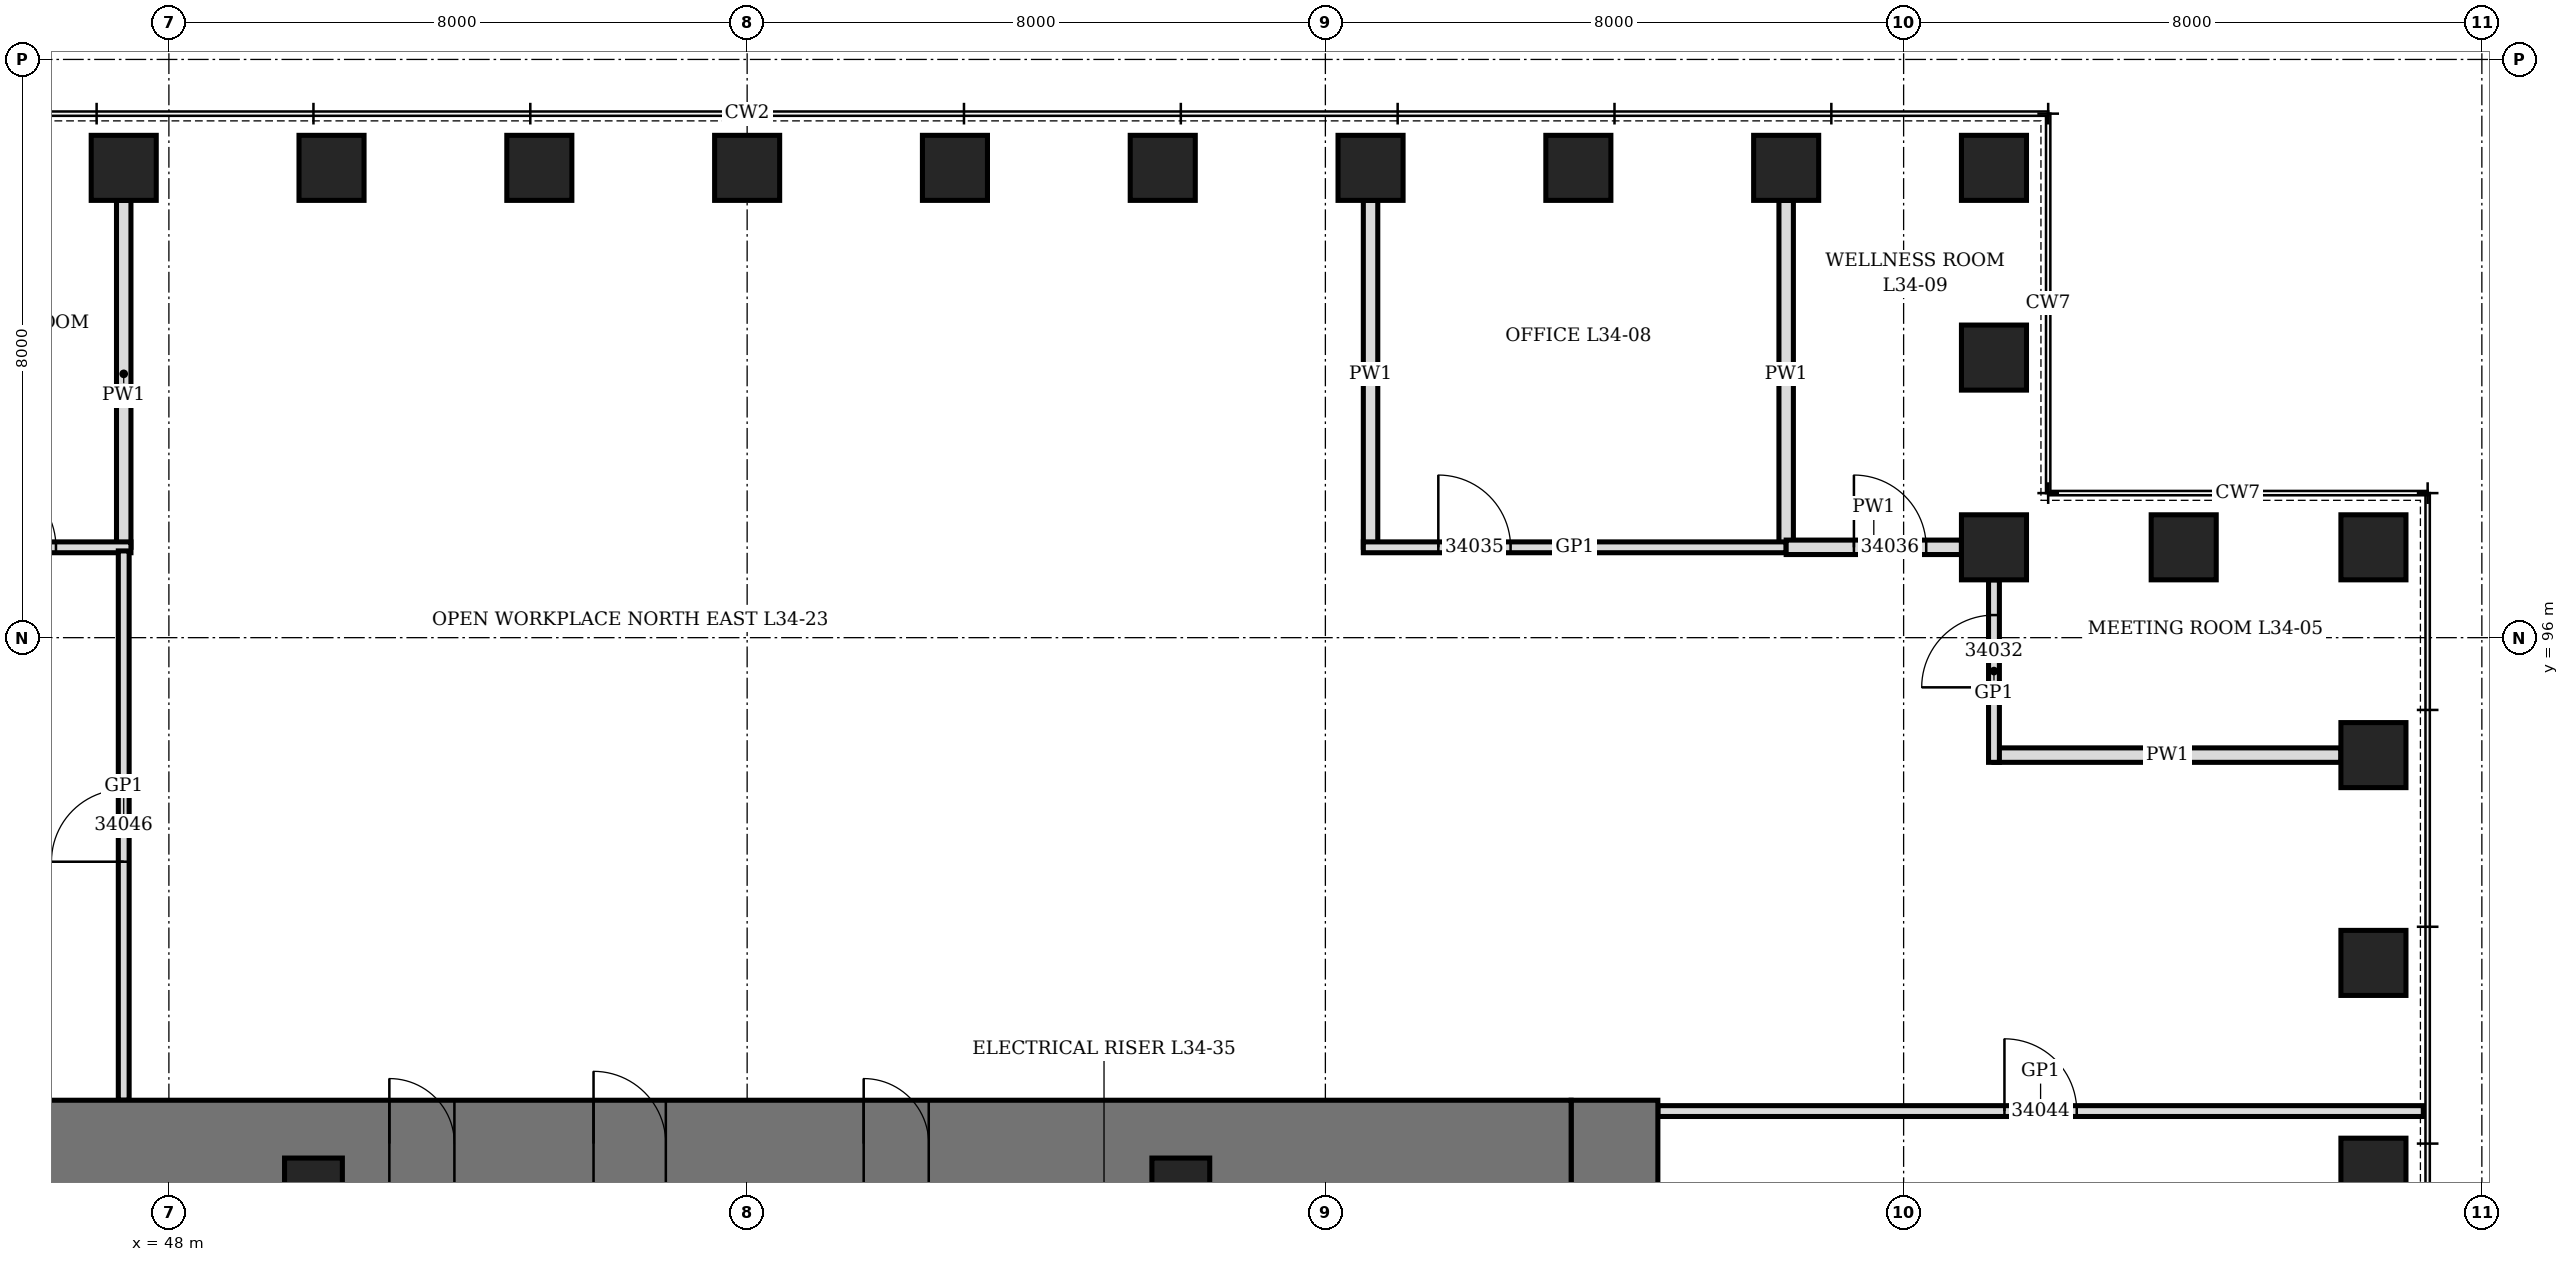
"""IFC4 building model, lengths in metres.
Left out: names, types, materials, properties, quantities, classifications, styles, units other than length and angle.
Written with IfcOpenShell. Run it as: python <this file> out.ifc"""

import sys

from ifc_helpers import new_model, si_unit, direction, frame, frame_2d, origin, origin_2d, place, context, subcontext, project, spatial, rectangle, hollow_rectangle, extrude, element, fill, save


model = new_model("IFC4")
c1 = context("Model", 3, precision=1e-05, world=origin(), true_north=direction((0.0, 1.0)))
c2 = subcontext(c1, "Body", "Model", "MODEL_VIEW")
j1 = project(units=[si_unit("LENGTHUNIT", "METRE"), si_unit("PLANEANGLEUNIT", "RADIAN")], contexts=[c1])
p1 = place(None, origin())
s1 = spatial("IfcSite", under=j1, at=p1, CompositionType="ELEMENT")
p2 = place(p1, origin())
s2 = spatial("IfcBuilding", under=s1, at=p2, CompositionType="ELEMENT")
p3 = place(p2, frame((0.0, 0.0, 154.3)))
s3 = spatial("IfcBuildingStorey", under=s2, at=p3, CompositionType="ELEMENT", Elevation=154.3)
for number, where, z_axis, x_axis in (
    (1, (78.5, 88.625, 0.0), (0.0, 0.0, 1.0), (0.0, 1.0, 0.0)),
    (2, (78.5, 91.5, 0.0), (0.0, 0.0, 1.0), (0.0, 1.0, 0.0)),
    (3, (78.5, 94.375, 0.0), (0.0, 0.0, 1.0), (0.0, 1.0, 0.0)),
    (4, (78.5, 97.25, 0.0), (0.0, 0.0, 1.0), (1.0, 0.0, 0.0)),
    (5, (75.875, 97.25, 0.0), (0.0, 0.0, 1.0), (1.0, 0.0, 0.0)),
    (6, (73.25, 97.25, 0.0), (0.0, 0.0, 1.0), (0.0, 1.0, 0.0)),
    (7, (73.25, 99.875, 0.0), (0.0, 0.0, 1.0), (0.0, 1.0, 0.0)),
    (8, (73.25, 102.5, 0.0), (0.0, 0.0, 1.0), (1.0, 0.0, 0.0)),
    (9, (70.375, 102.5, 0.0), (0.0, 0.0, 1.0), (1.0, 0.0, 0.0)),
    (10, (67.5, 102.5, 0.0), (0.0, 0.0, 1.0), (1.0, 0.0, 0.0)),
    (11, (64.625, 102.5, 0.0), (0.0, 0.0, 1.0), (1.0, 0.0, 0.0)),
    (12, (61.75, 102.5, 0.0), (0.0, 0.0, 1.0), (1.0, 0.0, 0.0)),
    (13, (58.875, 102.5, 0.0), (0.0, 0.0, 1.0), (1.0, 0.0, 0.0)),
    (14, (56.0, 102.5, 0.0), (0.0, 0.0, 1.0), (1.0, 0.0, 0.0)),
    (15, (53.125, 102.5, 0.0), (0.0, 0.0, 1.0), (1.0, 0.0, 0.0)),
    (16, (50.25, 102.5, 0.0), (0.0, 0.0, 1.0), (1.0, 0.0, 0.0)),
    (17, (47.375, 102.5, 0.0), (0.0, 0.0, 1.0), (1.0, 0.0, 0.0)),
):
    element("IfcColumn", number, at=place(p3, frame(where, z_axis=z_axis, x_axis=x_axis)), inside=s3, PredefinedType="COLUMN", context=c2, shape_type="SweptSolid", body=[
        extrude(hollow_rectangle(XDim=0.9, YDim=0.9, WallThickness=0.12, at=origin_2d()), origin(), (0.0, 0.0, 1.0), 4.2),
    ])
p4 = place(p3, frame((68.0, 70.4, 0.0), z_axis=(0.0, 0.0, 1.0), x_axis=(0.0, 1.0, 0.0)))
e18 = element("IfcWall", 18, at=p4, inside=s3, PredefinedType="SHEAR", context=c2, shape_type="SweptSolid", body=[
    extrude(rectangle(XDim=19.2, YDim=1.2, at=frame_2d((9.6, 0.0))), origin(), (0.0, 0.0, 1.0), 4.2),
])
p5 = place(p4, frame((8.6, 0.0, 0.0)))
e19 = element("IfcOpeningElement", 19, at=p5, cuts=e18, PredefinedType="OPENING", context=c2, shape_type="SweptSolid", body=[
    extrude(rectangle(XDim=2.0, YDim=2.4, at=frame_2d((1.0, 1.2))), frame((0.0, 0.61, 0.0), z_axis=(0.0, -1.0, 0.0), x_axis=(1.0, 0.0, 0.0)), (0.0, 0.0, 1.0), 1.22),
])
p6 = place(p3, frame((44.6, 89.0, 0.0), z_axis=(0.0, 0.0, 1.0), x_axis=(1.0, 0.0, 0.0)))
e20 = element("IfcWall", 20, at=p6, inside=s3, PredefinedType="SHEAR", context=c2, shape_type="SweptSolid", body=[
    extrude(rectangle(XDim=22.8, YDim=1.2, at=frame_2d((11.4, 0.0))), origin(), (0.0, 0.0, 1.0), 4.2),
])
p7 = place(p6, frame((9.275, 0.0, 0.0)))
e21 = element("IfcOpeningElement", 21, at=p7, cuts=e20, PredefinedType="OPENING", context=c2, shape_type="SweptSolid", body=[
    extrude(rectangle(XDim=1.0, YDim=2.1, at=frame_2d((0.5, 1.05))), frame((0.0, 0.61, 0.0), z_axis=(0.0, -1.0, 0.0), x_axis=(1.0, 0.0, 0.0)), (0.0, 0.0, 1.0), 1.22),
])
p8 = place(p6, frame((6.45, 0.0, 0.0)))
e22 = element("IfcOpeningElement", 22, at=p8, cuts=e20, PredefinedType="OPENING", context=c2, shape_type="SweptSolid", body=[
    extrude(rectangle(XDim=0.9, YDim=2.1, at=frame_2d((0.45, 1.05))), frame((0.0, 0.61, 0.0), z_axis=(0.0, -1.0, 0.0), x_axis=(1.0, 0.0, 0.0)), (0.0, 0.0, 1.0), 1.22),
])
p9 = place(p6, frame((13.012, 0.0, 0.0)))
e23 = element("IfcOpeningElement", 23, at=p9, cuts=e20, PredefinedType="OPENING", context=c2, shape_type="SweptSolid", body=[
    extrude(rectangle(XDim=0.9, YDim=2.1, at=frame_2d((0.45, 1.05))), frame((0.0, 0.61, 0.0), z_axis=(0.0, -1.0, 0.0), x_axis=(1.0, 0.0, 0.0)), (0.0, 0.0, 1.0), 1.22),
])
for number, where, z_axis, x_axis in (
    (24, (50.0, 88.4, 0.0), (0.0, 0.0, 1.0), (1.0, 0.0, 0.0)),
    (25, (62.0, 88.4, 0.0), (0.0, 0.0, 1.0), (1.0, 0.0, 0.0)),
):
    element("IfcColumn", number, at=place(p3, frame(where, z_axis=z_axis, x_axis=x_axis)), inside=s3, PredefinedType="COLUMN", context=c2, shape_type="SweptSolid", body=[
        extrude(hollow_rectangle(XDim=0.8, YDim=0.8, WallThickness=0.1, at=origin_2d()), origin(), (0.0, 0.0, 1.0), 4.2),
    ])
p10 = place(p3, frame((73.25, 94.375, 0.0), z_axis=(0.0, 0.0, 1.0), x_axis=(1.0, 0.0, 0.0)))
e26 = element("IfcWall", 26, at=p10, inside=s3, PredefinedType="PARTITIONING", context=c2, shape_type="SweptSolid", body=[
    extrude(rectangle(XDim=4.8, YDim=0.2, at=frame_2d((2.4, 0.0))), origin(), (0.0, 0.0, 1.0), 3.428),
])
for number, where, z_axis, x_axis in (
    (27, (47.375, 97.25, 0.0), (0.0, 0.0, 1.0), (0.0, 1.0, 0.0)),
    (28, (64.625, 97.25, 0.0), (0.0, 0.0, 1.0), (0.0, 1.0, 0.0)),
):
    element("IfcWall", number, at=place(p3, frame(where, z_axis=z_axis, x_axis=x_axis)), inside=s3, PredefinedType="PARTITIONING", context=c2, shape_type="SweptSolid", body=[
        extrude(rectangle(XDim=4.8, YDim=0.2, at=frame_2d((2.4, 0.0))), origin(), (0.0, 0.0, 1.0), 3.278),
    ])
p11 = place(p3, frame((70.375, 97.25, 0.0), z_axis=(0.0, 0.0, 1.0), x_axis=(0.0, 1.0, 0.0)))
e29 = element("IfcWall", 29, at=p11, inside=s3, PredefinedType="PARTITIONING", context=c2, shape_type="SweptSolid", body=[
    extrude(rectangle(XDim=4.8, YDim=0.2, at=frame_2d((2.4, 0.0))), origin(), (0.0, 0.0, 1.0), 3.428),
])
p12 = place(p3, frame((68.6, 89.45, 0.0), z_axis=(0.0, 0.0, 1.0), x_axis=(1.0, 0.0, 0.0)))
e30 = element("IfcWall", 30, at=p12, inside=s3, PredefinedType="PARTITIONING", context=c2, shape_type="SweptSolid", body=[
    extrude(rectangle(XDim=10.59, YDim=0.15, at=frame_2d((5.295, 0.0))), origin(), (0.0, 0.0, 1.0), 4.04),
])
p13 = place(p12, frame((4.795, 0.0, 0.0)))
e31 = element("IfcOpeningElement", 31, at=p13, cuts=e30, PredefinedType="OPENING", context=c2, shape_type="SweptSolid", body=[
    extrude(rectangle(XDim=1.0, YDim=2.4, at=frame_2d((0.5, 1.2))), frame((0.0, 0.085, 0.0), z_axis=(0.0, -1.0, 0.0), x_axis=(1.0, 0.0, 0.0)), (0.0, 0.0, 1.0), 0.17),
])
p14 = place(p3, frame((44.4, 97.25, 0.0), z_axis=(0.0, 0.0, 1.0), x_axis=(1.0, 0.0, 0.0)))
e32 = element("IfcWall", 32, at=p14, inside=s3, PredefinedType="PARTITIONING", context=c2, shape_type="SweptSolid", body=[
    extrude(rectangle(XDim=3.075, YDim=0.15, at=frame_2d((1.538, 0.0))), origin(), (0.0, 0.0, 1.0), 4.04),
])
p15 = place(p14, frame((1.038, 0.0, 0.0)))
e33 = element("IfcOpeningElement", 33, at=p15, cuts=e32, PredefinedType="OPENING", context=c2, shape_type="SweptSolid", body=[
    extrude(rectangle(XDim=1.0, YDim=2.4, at=frame_2d((0.5, 1.2))), frame((0.0, 0.085, 0.0), z_axis=(0.0, -1.0, 0.0), x_axis=(1.0, 0.0, 0.0)), (0.0, 0.0, 1.0), 0.17),
])
p16 = place(p3, frame((64.525, 97.25, 0.0), z_axis=(0.0, 0.0, 1.0), x_axis=(1.0, 0.0, 0.0)))
e34 = element("IfcWall", 34, at=p16, inside=s3, PredefinedType="PARTITIONING", context=c2, shape_type="SweptSolid", body=[
    extrude(rectangle(XDim=5.85, YDim=0.15, at=frame_2d((2.925, 0.0))), origin(), (0.0, 0.0, 1.0), 4.04),
])
p17 = place(p16, frame((1.038, 0.0, 0.0)))
e35 = element("IfcOpeningElement", 35, at=p17, cuts=e34, PredefinedType="OPENING", context=c2, shape_type="SweptSolid", body=[
    extrude(rectangle(XDim=1.0, YDim=2.1, at=frame_2d((0.5, 1.05))), frame((0.0, 0.085, 0.0), z_axis=(0.0, -1.0, 0.0), x_axis=(1.0, 0.0, 0.0)), (0.0, 0.0, 1.0), 0.17),
])
p18 = place(p3, frame((70.375, 97.25, 0.0), z_axis=(0.0, 0.0, 1.0), x_axis=(1.0, 0.0, 0.0)))
e36 = element("IfcWall", 36, at=p18, inside=s3, PredefinedType="PARTITIONING", context=c2, shape_type="SweptSolid", body=[
    extrude(rectangle(XDim=2.425, YDim=0.2, at=frame_2d((1.212, 0.0))), origin(), (0.0, 0.0, 1.0), 4.04),
])
p19 = place(p18, frame((0.938, 0.0, 0.0)))
e37 = element("IfcOpeningElement", 37, at=p19, cuts=e36, PredefinedType="OPENING", context=c2, shape_type="SweptSolid", body=[
    extrude(rectangle(XDim=1.0, YDim=2.1, at=frame_2d((0.5, 1.05))), frame((0.0, 0.11, 0.0), z_axis=(0.0, -1.0, 0.0), x_axis=(1.0, 0.0, 0.0)), (0.0, 0.0, 1.0), 0.22),
])
p20 = place(p3, frame((47.375, 89.6, 0.0), z_axis=(0.0, 0.0, 1.0), x_axis=(0.0, 1.0, 0.0)))
e38 = element("IfcWall", 38, at=p20, inside=s3, PredefinedType="PARTITIONING", context=c2, shape_type="SweptSolid", body=[
    extrude(rectangle(XDim=7.6, YDim=0.15, at=frame_2d((3.8, 0.0))), origin(), (0.0, 0.0, 1.0), 3.278),
])
p21 = place(p20, frame((3.3, 0.0, 0.0)))
e39 = element("IfcOpeningElement", 39, at=p21, cuts=e38, PredefinedType="OPENING", context=c2, shape_type="SweptSolid", body=[
    extrude(rectangle(XDim=1.0, YDim=2.4, at=frame_2d((0.5, 1.2))), frame((0.0, 0.085, 0.0), z_axis=(0.0, -1.0, 0.0), x_axis=(1.0, 0.0, 0.0)), (0.0, 0.0, 1.0), 0.17),
])
p22 = place(p3, frame((73.25, 94.275, 0.0), z_axis=(0.0, 0.0, 1.0), x_axis=(0.0, 1.0, 0.0)))
e40 = element("IfcWall", 40, at=p22, inside=s3, PredefinedType="PARTITIONING", context=c2, shape_type="SweptSolid", body=[
    extrude(rectangle(XDim=2.525, YDim=0.15, at=frame_2d((1.263, 0.0))), origin(), (0.0, 0.0, 1.0), 4.04),
])
p23 = place(p22, frame((1.038, 0.0, 0.0)))
e41 = element("IfcOpeningElement", 41, at=p23, cuts=e40, PredefinedType="OPENING", context=c2, shape_type="SweptSolid", body=[
    extrude(rectangle(XDim=1.0, YDim=2.4, at=frame_2d((0.5, 1.2))), frame((0.0, 0.085, 0.0), z_axis=(0.0, -1.0, 0.0), x_axis=(1.0, 0.0, 0.0)), (0.0, 0.0, 1.0), 0.17),
])
p24 = place(p7, origin())
e42 = element("IfcDoor", 42, at=p24, inside=s3, OperationType="SINGLE_SWING_LEFT", PredefinedType="DOOR", context=c2, shape_type="SweptSolid", body=[
    extrude(rectangle(XDim=1.0, YDim=2.1, at=frame_2d((0.5, 1.05))), frame((0.0, 0.35, 0.0), z_axis=(0.0, -1.0, 0.0), x_axis=(1.0, 0.0, 0.0)), (0.0, 0.0, 1.0), 0.7),
])
fill(e21, e42)
p25 = place(p8, origin())
e43 = element("IfcDoor", 43, at=p25, inside=s3, OperationType="SINGLE_SWING_LEFT", PredefinedType="DOOR", context=c2, shape_type="SweptSolid", body=[
    extrude(rectangle(XDim=0.9, YDim=2.1, at=frame_2d((0.45, 1.05))), frame((0.0, 0.35, 0.0), z_axis=(0.0, -1.0, 0.0), x_axis=(1.0, 0.0, 0.0)), (0.0, 0.0, 1.0), 0.7),
])
fill(e22, e43)
p26 = place(p9, origin())
e44 = element("IfcDoor", 44, at=p26, inside=s3, OperationType="SINGLE_SWING_LEFT", PredefinedType="DOOR", context=c2, shape_type="SweptSolid", body=[
    extrude(rectangle(XDim=0.9, YDim=2.1, at=frame_2d((0.45, 1.05))), frame((0.0, 0.35, 0.0), z_axis=(0.0, -1.0, 0.0), x_axis=(1.0, 0.0, 0.0)), (0.0, 0.0, 1.0), 0.7),
])
fill(e23, e44)
p27 = place(p23, origin())
e45 = element("IfcDoor", 45, at=p27, inside=s3, OperationType="SINGLE_SWING_RIGHT", PredefinedType="DOOR", context=c2, shape_type="SweptSolid", body=[
    extrude(rectangle(XDim=1.0, YDim=2.4, at=frame_2d((0.5, 1.2))), frame((0.0, 0.075, 0.0), z_axis=(0.0, -1.0, 0.0), x_axis=(1.0, 0.0, 0.0)), (0.0, 0.0, 1.0), 0.149),
])
fill(e41, e45)
p28 = place(p15, origin())
e46 = element("IfcDoor", 46, at=p28, inside=s3, OperationType="SINGLE_SWING_RIGHT", PredefinedType="DOOR", context=c2, shape_type="SweptSolid", body=[
    extrude(rectangle(XDim=1.0, YDim=2.4, at=frame_2d((0.5, 1.2))), frame((0.0, 0.075, 0.0), z_axis=(0.0, -1.0, 0.0), x_axis=(1.0, 0.0, 0.0)), (0.0, 0.0, 1.0), 0.149),
])
fill(e33, e46)
p29 = place(p17, origin())
e47 = element("IfcDoor", 47, at=p29, inside=s3, OperationType="SINGLE_SWING_LEFT", PredefinedType="DOOR", context=c2, shape_type="SweptSolid", body=[
    extrude(rectangle(XDim=1.0, YDim=2.1, at=frame_2d((0.5, 1.05))), frame((0.0, 0.075, 0.0), z_axis=(0.0, -1.0, 0.0), x_axis=(1.0, 0.0, 0.0)), (0.0, 0.0, 1.0), 0.149),
])
fill(e35, e47)
p30 = place(p19, origin())
e48 = element("IfcDoor", 48, at=p30, inside=s3, OperationType="SINGLE_SWING_LEFT", PredefinedType="DOOR", context=c2, shape_type="SweptSolid", body=[
    extrude(rectangle(XDim=1.0, YDim=2.1, at=frame_2d((0.5, 1.05))), frame((0.0, 0.1, 0.0), z_axis=(0.0, -1.0, 0.0), x_axis=(1.0, 0.0, 0.0)), (0.0, 0.0, 1.0), 0.199),
])
fill(e37, e48)
p31 = place(p13, origin())
e49 = element("IfcDoor", 49, at=p31, inside=s3, OperationType="SINGLE_SWING_RIGHT", PredefinedType="DOOR", context=c2, shape_type="SweptSolid", body=[
    extrude(rectangle(XDim=1.0, YDim=2.4, at=frame_2d((0.5, 1.2))), frame((0.0, 0.075, 0.0), z_axis=(0.0, -1.0, 0.0), x_axis=(1.0, 0.0, 0.0)), (0.0, 0.0, 1.0), 0.149),
])
fill(e31, e49)
p32 = place(p21, origin())
e50 = element("IfcDoor", 50, at=p32, inside=s3, OperationType="SINGLE_SWING_RIGHT", PredefinedType="DOOR", context=c2, shape_type="SweptSolid", body=[
    extrude(rectangle(XDim=1.0, YDim=2.4, at=frame_2d((0.5, 1.2))), frame((0.0, 0.075, 0.0), z_axis=(0.0, -1.0, 0.0), x_axis=(1.0, 0.0, 0.0)), (0.0, 0.0, 1.0), 0.149),
])
fill(e39, e50)
save(model, sys.argv[1])
